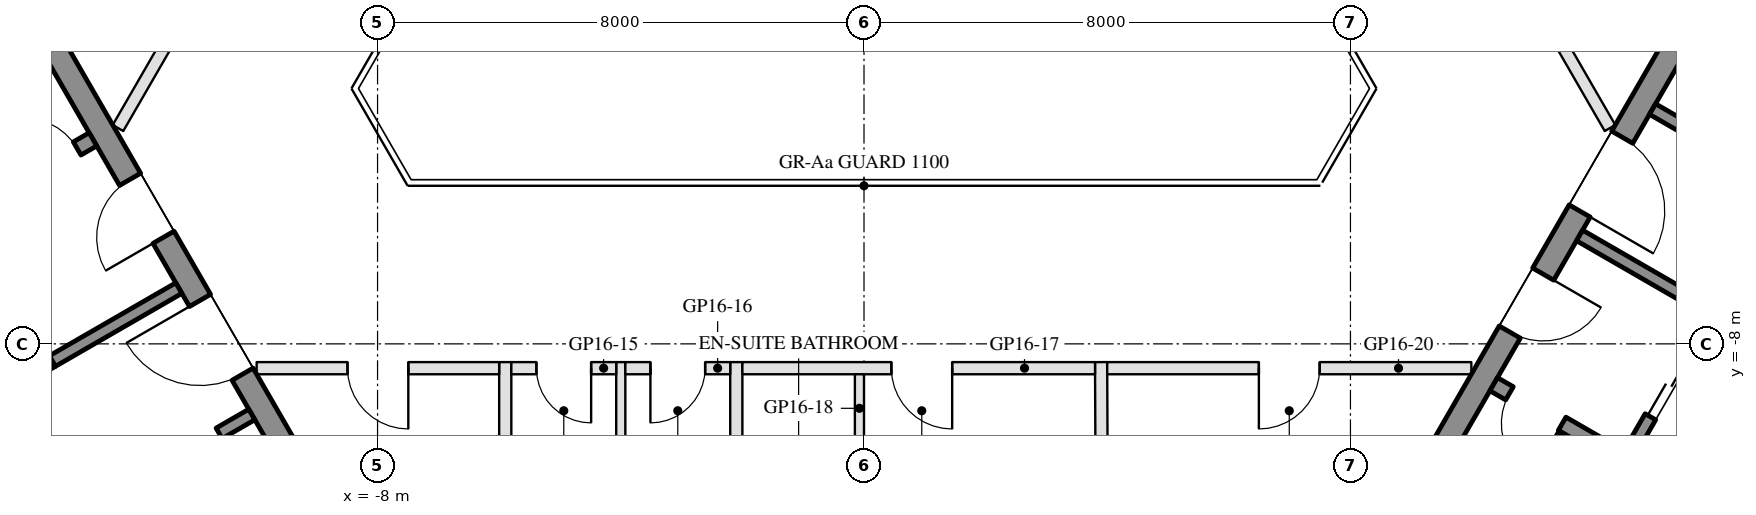
"""IFC4 building model, lengths in metres.
Left out: names, types, materials, properties, quantities, classifications, styles, units other than length and angle.
Written with IfcOpenShell. Run it as: python <this file> out.ifc"""

import sys

from ifc_helpers import new_model, si_unit, direction, frame, frame_2d, origin, place, context, subcontext, project, spatial, rectangle, extrude, element, fill, save


model = new_model("IFC4")
c1 = context("Model", 3, precision=1e-05, world=origin(), true_north=direction((0.0, 1.0)))
c2 = subcontext(c1, "Body", "Model", "MODEL_VIEW")
j1 = project(units=[si_unit("LENGTHUNIT", "METRE"), si_unit("PLANEANGLEUNIT", "RADIAN")], contexts=[c1])
p1 = place(None, origin())
s1 = spatial("IfcSite", under=j1, at=p1, CompositionType="ELEMENT")
p2 = place(p1, origin())
s2 = spatial("IfcBuilding", under=s1, at=p2, CompositionType="ELEMENT")
p3 = place(p2, frame((0.0, 0.0, 176.2)))
s3 = spatial("IfcBuildingStorey", under=s2, at=p3, CompositionType="ELEMENT", Elevation=176.2)
p4 = place(p3, frame((-13.845, -2.22, 0.0), z_axis=(0.0, 0.0, 1.0), x_axis=(0.500004234368, -0.866022959057, 0.0)))
e1 = element("IfcWall", 1, at=p4, inside=s3, PredefinedType="SHEAR", context=c2, shape_type="SweptSolid", body=[
    extrude(rectangle(XDim=10.0, YDim=0.4, at=frame_2d((5.0, 0.0))), origin(), (0.0, 0.0, 1.0), 3.5),
])
p5 = place(p4, frame((3.55, 0.0, 0.0)))
e2 = element("IfcOpeningElement", 2, at=p5, cuts=e1, PredefinedType="OPENING", context=c2, shape_type="SweptSolid", body=[
    extrude(rectangle(XDim=1.1, YDim=2.1, at=frame_2d((0.55, 1.05))), frame((0.0, 0.21, 0.0), z_axis=(0.0, -1.0, 0.0), x_axis=(1.0, 0.0, 0.0)), (0.0, 0.0, 1.0), 0.42),
])
p6 = place(p4, frame((5.85, 0.0, 0.0)))
e3 = element("IfcOpeningElement", 3, at=p6, cuts=e1, PredefinedType="OPENING", context=c2, shape_type="SweptSolid", body=[
    extrude(rectangle(XDim=1.4, YDim=2.1, at=frame_2d((0.7, 1.05))), frame((0.0, 0.21, 0.0), z_axis=(0.0, -1.0, 0.0), x_axis=(1.0, 0.0, 0.0)), (0.0, 0.0, 1.0), 0.42),
])
p7 = place(p3, frame((-12.681, -4.636, 0.0), z_axis=(0.0, 0.0, 1.0), x_axis=(-0.866021702275, -0.500006411147, 0.0)))
e4 = element("IfcWall", 4, at=p7, inside=s3, PredefinedType="SHEAR", context=c2, shape_type="SweptSolid", body=[
    extrude(rectangle(XDim=6.45, YDim=0.25, at=frame_2d((3.225, 0.0))), origin(), (0.0, 0.0, 1.0), 3.5),
])
p8 = place(p7, frame((0.3, 0.0, 0.0)))
e5 = element("IfcOpeningElement", 5, at=p8, cuts=e4, PredefinedType="OPENING", context=c2, shape_type="SweptSolid", body=[
    extrude(rectangle(XDim=1.0, YDim=2.1, at=frame_2d((0.5, 1.05))), frame((0.0, 0.135, 0.0), z_axis=(0.0, -1.0, 0.0), x_axis=(1.0, 0.0, 0.0)), (0.0, 0.0, 1.0), 0.27),
])
p9 = place(p3, frame((-14.783, -5.995, 0.0), z_axis=(0.0, 0.0, 1.0), x_axis=(0.49994636267, -0.866056369097, 0.0)))
e6 = element("IfcWall", 6, at=p9, inside=s3, PredefinedType="SHEAR", context=c2, shape_type="SweptSolid", body=[
    extrude(rectangle(XDim=2.8, YDim=0.2, at=frame_2d((1.4, 0.0))), origin(), (0.0, 0.0, 1.0), 3.5),
])
p10 = place(p9, frame((0.7, 0.0, 0.0)))
e7 = element("IfcOpeningElement", 7, at=p10, cuts=e6, PredefinedType="OPENING", context=c2, shape_type="SweptSolid", body=[
    extrude(rectangle(XDim=1.2, YDim=2.1, at=frame_2d((0.6, 1.05))), frame((0.0, 0.11, 0.0), z_axis=(0.0, -1.0, 0.0), x_axis=(1.0, 0.0, 0.0)), (0.0, 0.0, 1.0), 0.22),
])
p11 = place(p3, frame((-11.268, -7.083, 0.0), z_axis=(0.0, 0.0, 1.0), x_axis=(-0.866050077142, -0.499957262057, 0.0)))
e8 = element("IfcWall", 8, at=p11, inside=s3, PredefinedType="SHEAR", context=c2, shape_type="SweptSolid", body=[
    extrude(rectangle(XDim=2.4, YDim=0.2, at=frame_2d((1.2, 0.0))), origin(), (0.0, 0.0, 1.0), 3.5),
])
p12 = place(p3, frame((-10.068, -9.162, 0.0), z_axis=(0.0, 0.0, 1.0), x_axis=(-0.866032725843, -0.499987317609, 0.0)))
e9 = element("IfcWall", 9, at=p12, inside=s3, PredefinedType="SHEAR", context=c2, shape_type="SweptSolid", body=[
    extrude(rectangle(XDim=10.16, YDim=0.2, at=frame_2d((5.08, 0.0))), origin(), (0.0, 0.0, 1.0), 3.5),
])
p13 = place(p12, frame((0.62, 0.0, 0.0)))
e10 = element("IfcOpeningElement", 10, at=p13, cuts=e9, PredefinedType="OPENING", context=c2, shape_type="SweptSolid", body=[
    extrude(rectangle(XDim=1.1, YDim=2.1, at=frame_2d((0.55, 1.05))), frame((0.0, 0.11, 0.0), z_axis=(0.0, -1.0, 0.0), x_axis=(1.0, 0.0, 0.0)), (0.0, 0.0, 1.0), 0.22),
])
p14 = place(p12, frame((3.16, 0.0, 0.0)))
e11 = element("IfcOpeningElement", 11, at=p14, cuts=e9, PredefinedType="OPENING", context=c2, shape_type="SweptSolid", body=[
    extrude(rectangle(XDim=1.1, YDim=2.1, at=frame_2d((0.55, 1.05))), frame((0.0, 0.11, 0.0), z_axis=(0.0, -1.0, 0.0), x_axis=(1.0, 0.0, 0.0)), (0.0, 0.0, 1.0), 0.22),
])
p15 = place(p12, frame((5.7, 0.0, 0.0)))
e12 = element("IfcOpeningElement", 12, at=p15, cuts=e9, PredefinedType="OPENING", context=c2, shape_type="SweptSolid", body=[
    extrude(rectangle(XDim=1.1, YDim=2.1, at=frame_2d((0.55, 1.05))), frame((0.0, 0.11, 0.0), z_axis=(0.0, -1.0, 0.0), x_axis=(1.0, 0.0, 0.0)), (0.0, 0.0, 1.0), 0.22),
])
p16 = place(p12, frame((8.24, 0.0, 0.0)))
e13 = element("IfcOpeningElement", 13, at=p16, cuts=e9, PredefinedType="OPENING", context=c2, shape_type="SweptSolid", body=[
    extrude(rectangle(XDim=1.1, YDim=2.1, at=frame_2d((0.55, 1.05))), frame((0.0, 0.11, 0.0), z_axis=(0.0, -1.0, 0.0), x_axis=(1.0, 0.0, 0.0)), (0.0, 0.0, 1.0), 0.22),
])
p17 = place(p3, frame((8.845, -10.88, 0.0), z_axis=(0.0, 0.0, 1.0), x_axis=(0.500004234368, 0.866022959057, 0.0)))
e14 = element("IfcWall", 14, at=p17, inside=s3, PredefinedType="SHEAR", context=c2, shape_type="SweptSolid", body=[
    extrude(rectangle(XDim=10.0, YDim=0.4, at=frame_2d((5.0, 0.0))), origin(), (0.0, 0.0, 1.0), 3.5),
])
p18 = place(p17, frame((3.55, 0.0, 0.0)))
e15 = element("IfcOpeningElement", 15, at=p18, cuts=e14, PredefinedType="OPENING", context=c2, shape_type="SweptSolid", body=[
    extrude(rectangle(XDim=1.1, YDim=2.1, at=frame_2d((0.55, 1.05))), frame((0.0, 0.21, 0.0), z_axis=(0.0, -1.0, 0.0), x_axis=(1.0, 0.0, 0.0)), (0.0, 0.0, 1.0), 0.42),
])
p19 = place(p17, frame((5.85, 0.0, 0.0)))
e16 = element("IfcOpeningElement", 16, at=p19, cuts=e14, PredefinedType="OPENING", context=c2, shape_type="SweptSolid", body=[
    extrude(rectangle(XDim=1.4, YDim=2.1, at=frame_2d((0.7, 1.05))), frame((0.0, 0.21, 0.0), z_axis=(0.0, -1.0, 0.0), x_axis=(1.0, 0.0, 0.0)), (0.0, 0.0, 1.0), 0.42),
])
p20 = place(p3, frame((10.356, -8.664, 0.0), z_axis=(0.0, 0.0, 1.0), x_axis=(0.866028629588, -0.499994412703, 0.0)))
e17 = element("IfcWall", 17, at=p20, inside=s3, PredefinedType="SHEAR", context=c2, shape_type="SweptSolid", body=[
    extrude(rectangle(XDim=6.45, YDim=0.25, at=frame_2d((3.225, 0.0))), origin(), (0.0, 0.0, 1.0), 3.5),
])
p21 = place(p20, frame((0.3, 0.0, 0.0)))
e18 = element("IfcOpeningElement", 18, at=p21, cuts=e17, PredefinedType="OPENING", context=c2, shape_type="SweptSolid", body=[
    extrude(rectangle(XDim=1.0, YDim=2.1, at=frame_2d((0.5, 1.05))), frame((0.0, 0.135, 0.0), z_axis=(0.0, -1.0, 0.0), x_axis=(1.0, 0.0, 0.0)), (0.0, 0.0, 1.0), 0.27),
])
p22 = place(p3, frame((12.583, -9.805, 0.0), z_axis=(0.0, 0.0, 1.0), x_axis=(0.49994636267, 0.866056369097, 0.0)))
e19 = element("IfcWall", 19, at=p22, inside=s3, PredefinedType="SHEAR", context=c2, shape_type="SweptSolid", body=[
    extrude(rectangle(XDim=2.8, YDim=0.2, at=frame_2d((1.4, 0.0))), origin(), (0.0, 0.0, 1.0), 3.5),
])
p23 = place(p22, frame((0.7, 0.0, 0.0)))
e20 = element("IfcOpeningElement", 20, at=p23, cuts=e19, PredefinedType="OPENING", context=c2, shape_type="SweptSolid", body=[
    extrude(rectangle(XDim=1.2, YDim=2.1, at=frame_2d((0.6, 1.05))), frame((0.0, 0.11, 0.0), z_axis=(0.0, -1.0, 0.0), x_axis=(1.0, 0.0, 0.0)), (0.0, 0.0, 1.0), 0.22),
])
p24 = place(p3, frame((11.768, -6.217, 0.0), z_axis=(0.0, 0.0, 1.0), x_axis=(0.866050077142, -0.499957262057, 0.0)))
e21 = element("IfcWall", 21, at=p24, inside=s3, PredefinedType="SHEAR", context=c2, shape_type="SweptSolid", body=[
    extrude(rectangle(XDim=2.4, YDim=0.2, at=frame_2d((1.2, 0.0))), origin(), (0.0, 0.0, 1.0), 3.5),
])
p25 = place(p3, frame((12.968, -4.138, 0.0), z_axis=(0.0, 0.0, 1.0), x_axis=(0.866028328073, -0.49999493495, 0.0)))
e22 = element("IfcWall", 22, at=p25, inside=s3, PredefinedType="SHEAR", context=c2, shape_type="SweptSolid", body=[
    extrude(rectangle(XDim=10.16, YDim=0.2, at=frame_2d((5.08, 0.0))), origin(), (0.0, 0.0, 1.0), 3.5),
])
p26 = place(p25, frame((3.26, 0.0, 0.0)))
e23 = element("IfcOpeningElement", 23, at=p26, cuts=e22, PredefinedType="OPENING", context=c2, shape_type="SweptSolid", body=[
    extrude(rectangle(XDim=0.9, YDim=2.1, at=frame_2d((0.45, 1.05))), frame((0.0, 0.11, 0.0), z_axis=(0.0, -1.0, 0.0), x_axis=(1.0, 0.0, 0.0)), (0.0, 0.0, 1.0), 0.22),
])
p27 = place(p25, frame((8.34, 0.0, 0.0)))
e24 = element("IfcOpeningElement", 24, at=p27, cuts=e22, PredefinedType="OPENING", context=c2, shape_type="SweptSolid", body=[
    extrude(rectangle(XDim=0.9, YDim=2.1, at=frame_2d((0.45, 1.05))), frame((0.0, 0.11, 0.0), z_axis=(0.0, -1.0, 0.0), x_axis=(1.0, 0.0, 0.0)), (0.0, 0.0, 1.0), 0.22),
])
for number, where, z_axis, x_axis in (
    (25, (-5.9, -18.38, 0.0), (0.0, 0.0, 1.0), (0.0, 1.0, 0.0)),
    (26, (-2.1, -18.38, 0.0), (0.0, 0.0, 1.0), (0.0, 1.0, 0.0)),
):
    element("IfcWall", number, at=place(p3, frame(where, z_axis=z_axis, x_axis=x_axis)), inside=s3, PredefinedType="PARTITIONING", context=c2, shape_type="SweptSolid", body=[
        extrude(rectangle(XDim=10.08, YDim=0.2, at=frame_2d((5.04, 0.0))), origin(), (0.0, 0.0, 1.0), 3.06),
    ])
p28 = place(p3, frame((3.95, -19.28, 0.0), z_axis=(0.0, 0.0, 1.0), x_axis=(-0.004624844922, 0.999989305348, 0.0)))
e27 = element("IfcWall", 27, at=p28, inside=s3, PredefinedType="PARTITIONING", context=c2, shape_type="SweptSolid", body=[
    extrude(rectangle(XDim=10.98, YDim=0.2, at=frame_2d((5.49, 0.0))), origin(), (0.0, 0.0, 1.0), 2.95),
])
p29 = place(p3, frame((-6.0, -8.4, 0.0), z_axis=(0.0, 0.0, 1.0), x_axis=(-1.0, 0.0, 0.0)))
e28 = element("IfcWall", 28, at=p29, inside=s3, PredefinedType="PARTITIONING", context=c2, shape_type="SweptSolid", body=[
    extrude(rectangle(XDim=3.988, YDim=0.2, at=frame_2d((1.994, 0.0))), origin(), (0.0, 0.0, 1.0), 2.95),
])
p30 = place(p29, frame((1.494, 0.0, 0.0)))
e29 = element("IfcOpeningElement", 29, at=p30, cuts=e28, PredefinedType="OPENING", context=c2, shape_type="SweptSolid", body=[
    extrude(rectangle(XDim=1.0, YDim=2.1, at=frame_2d((0.5, 1.05))), frame((0.0, 0.11, 0.0), z_axis=(0.0, -1.0, 0.0), x_axis=(1.0, 0.0, 0.0)), (0.0, 0.0, 1.0), 0.22),
])
p31 = place(p3, frame((-4.0, -18.38, 0.0), z_axis=(0.0, 0.0, 1.0), x_axis=(0.0, 1.0, 0.0)))
e30 = element("IfcWall", 30, at=p31, inside=s3, PredefinedType="PARTITIONING", context=c2, shape_type="SweptSolid", body=[
    extrude(rectangle(XDim=10.08, YDim=0.15, at=frame_2d((5.04, 0.0))), origin(), (0.0, 0.0, 1.0), 2.95),
])
p32 = place(p3, frame((-4.075, -8.4, 0.0), z_axis=(0.0, 0.0, 1.0), x_axis=(-1.0, 0.0, 0.0)))
e31 = element("IfcWall", 31, at=p32, inside=s3, PredefinedType="PARTITIONING", context=c2, shape_type="SweptSolid", body=[
    extrude(rectangle(XDim=1.725, YDim=0.2, at=frame_2d((0.863, 0.0))), origin(), (0.0, 0.0, 1.0), 3.55),
])
p33 = place(p32, frame((0.413, 0.0, 0.0)))
e32 = element("IfcOpeningElement", 32, at=p33, cuts=e31, PredefinedType="OPENING", context=c2, shape_type="SweptSolid", body=[
    extrude(rectangle(XDim=0.9, YDim=2.1, at=frame_2d((0.45, 1.05))), frame((0.0, 0.11, 0.0), z_axis=(0.0, -1.0, 0.0), x_axis=(1.0, 0.0, 0.0)), (0.0, 0.0, 1.0), 0.22),
])
p34 = place(p3, frame((-2.2, -8.4, 0.0), z_axis=(0.0, 0.0, 1.0), x_axis=(-1.0, 0.0, 0.0)))
e33 = element("IfcWall", 33, at=p34, inside=s3, PredefinedType="PARTITIONING", context=c2, shape_type="SweptSolid", body=[
    extrude(rectangle(XDim=1.725, YDim=0.2, at=frame_2d((0.863, 0.0))), origin(), (0.0, 0.0, 1.0), 2.95),
])
p35 = place(p34, frame((0.413, 0.0, 0.0)))
e34 = element("IfcOpeningElement", 34, at=p35, cuts=e33, PredefinedType="OPENING", context=c2, shape_type="SweptSolid", body=[
    extrude(rectangle(XDim=0.9, YDim=2.1, at=frame_2d((0.45, 1.05))), frame((0.0, 0.11, 0.0), z_axis=(0.0, -1.0, 0.0), x_axis=(1.0, 0.0, 0.0)), (0.0, 0.0, 1.0), 0.22),
])
p36 = place(p3, frame((3.8, -8.4, 0.0), z_axis=(0.0, 0.0, 1.0), x_axis=(-1.0, 0.0, 0.0)))
e35 = element("IfcWall", 35, at=p36, inside=s3, PredefinedType="PARTITIONING", context=c2, shape_type="SweptSolid", body=[
    extrude(rectangle(XDim=5.8, YDim=0.2, at=frame_2d((2.9, 0.0))), origin(), (0.0, 0.0, 1.0), 2.95),
])
p37 = place(p36, frame((2.35, 0.0, 0.0)))
e36 = element("IfcOpeningElement", 36, at=p37, cuts=e35, PredefinedType="OPENING", context=c2, shape_type="SweptSolid", body=[
    extrude(rectangle(XDim=1.0, YDim=2.1, at=frame_2d((0.5, 1.05))), frame((0.0, 0.11, 0.0), z_axis=(0.0, -1.0, 0.0), x_axis=(1.0, 0.0, 0.0)), (0.0, 0.0, 1.0), 0.22),
])
p38 = place(p3, frame((-0.075, -11.3, 0.0), z_axis=(0.0, 0.0, 1.0), x_axis=(0.0, 1.0, 0.0)))
e37 = element("IfcWall", 37, at=p38, inside=s3, PredefinedType="PARTITIONING", context=c2, shape_type="SweptSolid", body=[
    extrude(rectangle(XDim=2.8, YDim=0.15, at=frame_2d((1.4, 0.0))), origin(), (0.0, 0.0, 1.0), 2.95),
])
p39 = place(p38, frame((0.5, 0.0, 0.0)))
e38 = element("IfcOpeningElement", 38, at=p39, cuts=e37, PredefinedType="OPENING", context=c2, shape_type="SweptSolid", body=[
    extrude(rectangle(XDim=0.9, YDim=2.1, at=frame_2d((0.45, 1.05))), frame((0.0, 0.085, 0.0), z_axis=(0.0, -1.0, 0.0), x_axis=(1.0, 0.0, 0.0)), (0.0, 0.0, 1.0), 0.17),
])
p40 = place(p3, frame((9.988, -8.4, 0.0), z_axis=(0.0, 0.0, 1.0), x_axis=(-1.0, 0.0, 0.0)))
e39 = element("IfcWall", 39, at=p40, inside=s3, PredefinedType="PARTITIONING", context=c2, shape_type="SweptSolid", body=[
    extrude(rectangle(XDim=5.989, YDim=0.2, at=frame_2d((2.994, 0.0))), origin(), (0.0, 0.0, 1.0), 2.95),
])
p41 = place(p40, frame((2.494, 0.0, 0.0)))
e40 = element("IfcOpeningElement", 40, at=p41, cuts=e39, PredefinedType="OPENING", context=c2, shape_type="SweptSolid", body=[
    extrude(rectangle(XDim=1.0, YDim=2.1, at=frame_2d((0.5, 1.05))), frame((0.0, 0.11, 0.0), z_axis=(0.0, -1.0, 0.0), x_axis=(1.0, 0.0, 0.0)), (0.0, 0.0, 1.0), 0.22),
])
p42 = place(p3, frame((10.032, -0.576, 0.0), z_axis=(0.0, 0.0, 1.0), x_axis=(0.500042097992, -0.866001097133, 0.0)))
e41 = element("IfcWall", 41, at=p42, inside=s3, PredefinedType="PARTITIONING", context=c2, shape_type="SweptSolid", body=[
    extrude(rectangle(XDim=4.474, YDim=0.2, at=frame_2d((2.237, 0.0))), origin(), (0.0, 0.0, 1.0), 2.95),
])
p43 = place(p42, frame((1.737, 0.0, 0.0)))
e42 = element("IfcOpeningElement", 42, at=p43, cuts=e41, PredefinedType="OPENING", context=c2, shape_type="SweptSolid", body=[
    extrude(rectangle(XDim=1.0, YDim=2.1, at=frame_2d((0.5, 1.05))), frame((0.0, 0.11, 0.0), z_axis=(0.0, -1.0, 0.0), x_axis=(1.0, 0.0, 0.0)), (0.0, 0.0, 1.0), 0.22),
])
p44 = place(p3, frame((-12.269, -4.45, 0.0), z_axis=(0.0, 0.0, 1.0), x_axis=(0.500012125002, 0.866018403298, 0.0)))
e43 = element("IfcWall", 43, at=p44, inside=s3, PredefinedType="PARTITIONING", context=c2, shape_type="SweptSolid", body=[
    extrude(rectangle(XDim=4.888, YDim=0.2, at=frame_2d((2.444, 0.0))), origin(), (0.0, 0.0, 1.0), 2.95),
])
p45 = place(p44, frame((1.944, 0.0, 0.0)))
e44 = element("IfcOpeningElement", 44, at=p45, cuts=e43, PredefinedType="OPENING", context=c2, shape_type="SweptSolid", body=[
    extrude(rectangle(XDim=1.0, YDim=2.1, at=frame_2d((0.5, 1.05))), frame((0.0, 0.11, 0.0), z_axis=(0.0, -1.0, 0.0), x_axis=(1.0, 0.0, 0.0)), (0.0, 0.0, 1.0), 0.22),
])
p46 = place(p13, origin())
e45 = element("IfcDoor", 45, at=p46, inside=s3, OperationType="DOUBLE_DOOR_SLIDING", PredefinedType="DOOR", context=c2, shape_type="SweptSolid", body=[
    extrude(rectangle(XDim=1.1, YDim=2.1, at=frame_2d((0.55, 1.05))), frame((0.0, 0.025, 0.0), z_axis=(0.0, -1.0, 0.0), x_axis=(1.0, 0.0, 0.0)), (0.0, 0.0, 1.0), 0.05),
])
fill(e10, e45)
p47 = place(p5, frame((1.1, 0.0, 0.0), z_axis=(0.0, 0.0, 1.0), x_axis=(-1.0, 0.0, 0.0)))
e46 = element("IfcDoor", 46, at=p47, inside=s3, OperationType="SINGLE_SWING_LEFT", PredefinedType="DOOR", context=c2, shape_type="SweptSolid", body=[
    extrude(rectangle(XDim=1.1, YDim=2.1, at=frame_2d((0.55, 1.05))), frame((0.0, 0.025, 0.0), z_axis=(0.0, -1.0, 0.0), x_axis=(1.0, 0.0, 0.0)), (0.0, 0.0, 1.0), 0.05),
])
fill(e2, e46)
p48 = place(p6, frame((1.4, 0.0, 0.0), z_axis=(0.0, 0.0, 1.0), x_axis=(-1.0, 0.0, 0.0)))
e47 = element("IfcDoor", 47, at=p48, inside=s3, OperationType="DOUBLE_DOOR_SINGLE_SWING", PredefinedType="DOOR", context=c2, shape_type="SweptSolid", body=[
    extrude(rectangle(XDim=1.4, YDim=2.1, at=frame_2d((0.7, 1.05))), frame((0.0, 0.025, 0.0), z_axis=(0.0, -1.0, 0.0), x_axis=(1.0, 0.0, 0.0)), (0.0, 0.0, 1.0), 0.05),
])
fill(e3, e47)
p49 = place(p8, frame((1.0, 0.0, 0.0), z_axis=(0.0, 0.0, 1.0), x_axis=(-1.0, 0.0, 0.0)))
e48 = element("IfcDoor", 48, at=p49, inside=s3, OperationType="SINGLE_SWING_LEFT", PredefinedType="DOOR", context=c2, shape_type="SweptSolid", body=[
    extrude(rectangle(XDim=1.0, YDim=2.1, at=frame_2d((0.5, 1.05))), frame((0.0, 0.025, 0.0), z_axis=(0.0, -1.0, 0.0), x_axis=(1.0, 0.0, 0.0)), (0.0, 0.0, 1.0), 0.05),
])
fill(e5, e48)
p50 = place(p23, origin())
e49 = element("IfcDoor", 49, at=p50, inside=s3, OperationType="DOUBLE_DOOR_SLIDING", PredefinedType="DOOR", context=c2, shape_type="SweptSolid", body=[
    extrude(rectangle(XDim=1.2, YDim=2.1, at=frame_2d((0.6, 1.05))), frame((0.0, 0.025, 0.0), z_axis=(0.0, -1.0, 0.0), x_axis=(1.0, 0.0, 0.0)), (0.0, 0.0, 1.0), 0.05),
])
fill(e20, e49)
p51 = place(p18, frame((1.1, 0.0, 0.0), z_axis=(0.0, 0.0, 1.0), x_axis=(-1.0, 0.0, 0.0)))
e50 = element("IfcDoor", 50, at=p51, inside=s3, OperationType="SINGLE_SWING_LEFT", PredefinedType="DOOR", context=c2, shape_type="SweptSolid", body=[
    extrude(rectangle(XDim=1.1, YDim=2.1, at=frame_2d((0.55, 1.05))), frame((0.0, 0.025, 0.0), z_axis=(0.0, -1.0, 0.0), x_axis=(1.0, 0.0, 0.0)), (0.0, 0.0, 1.0), 0.05),
])
fill(e15, e50)
p52 = place(p19, frame((1.4, 0.0, 0.0), z_axis=(0.0, 0.0, 1.0), x_axis=(-1.0, 0.0, 0.0)))
e51 = element("IfcDoor", 51, at=p52, inside=s3, OperationType="DOUBLE_DOOR_SINGLE_SWING", PredefinedType="DOOR", context=c2, shape_type="SweptSolid", body=[
    extrude(rectangle(XDim=1.4, YDim=2.1, at=frame_2d((0.7, 1.05))), frame((0.0, 0.025, 0.0), z_axis=(0.0, -1.0, 0.0), x_axis=(1.0, 0.0, 0.0)), (0.0, 0.0, 1.0), 0.05),
])
fill(e16, e51)
p53 = place(p21, frame((1.0, 0.0, 0.0), z_axis=(0.0, 0.0, 1.0), x_axis=(-1.0, 0.0, 0.0)))
e52 = element("IfcDoor", 52, at=p53, inside=s3, OperationType="SINGLE_SWING_LEFT", PredefinedType="DOOR", context=c2, shape_type="SweptSolid", body=[
    extrude(rectangle(XDim=1.0, YDim=2.1, at=frame_2d((0.5, 1.05))), frame((0.0, 0.025, 0.0), z_axis=(0.0, -1.0, 0.0), x_axis=(1.0, 0.0, 0.0)), (0.0, 0.0, 1.0), 0.05),
])
fill(e18, e52)
p54 = place(p30, origin())
e53 = element("IfcDoor", 53, at=p54, inside=s3, OperationType="SINGLE_SWING_LEFT", PredefinedType="DOOR", context=c2, shape_type="SweptSolid", body=[
    extrude(rectangle(XDim=1.0, YDim=2.1, at=frame_2d((0.5, 1.05))), frame((0.0, 0.025, 0.0), z_axis=(0.0, -1.0, 0.0), x_axis=(1.0, 0.0, 0.0)), (0.0, 0.0, 1.0), 0.05),
])
fill(e29, e53)
p55 = place(p33, origin())
e54 = element("IfcDoor", 54, at=p55, inside=s3, OperationType="SINGLE_SWING_LEFT", PredefinedType="DOOR", context=c2, shape_type="SweptSolid", body=[
    extrude(rectangle(XDim=0.9, YDim=2.1, at=frame_2d((0.45, 1.05))), frame((0.0, 0.025, 0.0), z_axis=(0.0, -1.0, 0.0), x_axis=(1.0, 0.0, 0.0)), (0.0, 0.0, 1.0), 0.05),
])
fill(e32, e54)
p56 = place(p35, origin())
e55 = element("IfcDoor", 55, at=p56, inside=s3, OperationType="SINGLE_SWING_RIGHT", PredefinedType="DOOR", context=c2, shape_type="SweptSolid", body=[
    extrude(rectangle(XDim=0.9, YDim=2.1, at=frame_2d((0.45, 1.05))), frame((0.0, 0.025, 0.0), z_axis=(0.0, -1.0, 0.0), x_axis=(1.0, 0.0, 0.0)), (0.0, 0.0, 1.0), 0.05),
])
fill(e34, e55)
p57 = place(p37, origin())
e56 = element("IfcDoor", 56, at=p57, inside=s3, OperationType="SINGLE_SWING_LEFT", PredefinedType="DOOR", context=c2, shape_type="SweptSolid", body=[
    extrude(rectangle(XDim=1.0, YDim=2.1, at=frame_2d((0.5, 1.05))), frame((0.0, 0.025, 0.0), z_axis=(0.0, -1.0, 0.0), x_axis=(1.0, 0.0, 0.0)), (0.0, 0.0, 1.0), 0.05),
])
fill(e36, e56)
p58 = place(p41, origin())
e57 = element("IfcDoor", 57, at=p58, inside=s3, OperationType="SINGLE_SWING_RIGHT", PredefinedType="DOOR", context=c2, shape_type="SweptSolid", body=[
    extrude(rectangle(XDim=1.0, YDim=2.1, at=frame_2d((0.5, 1.05))), frame((0.0, 0.025, 0.0), z_axis=(0.0, -1.0, 0.0), x_axis=(1.0, 0.0, 0.0)), (0.0, 0.0, 1.0), 0.05),
])
fill(e40, e57)
save(model, sys.argv[1])
